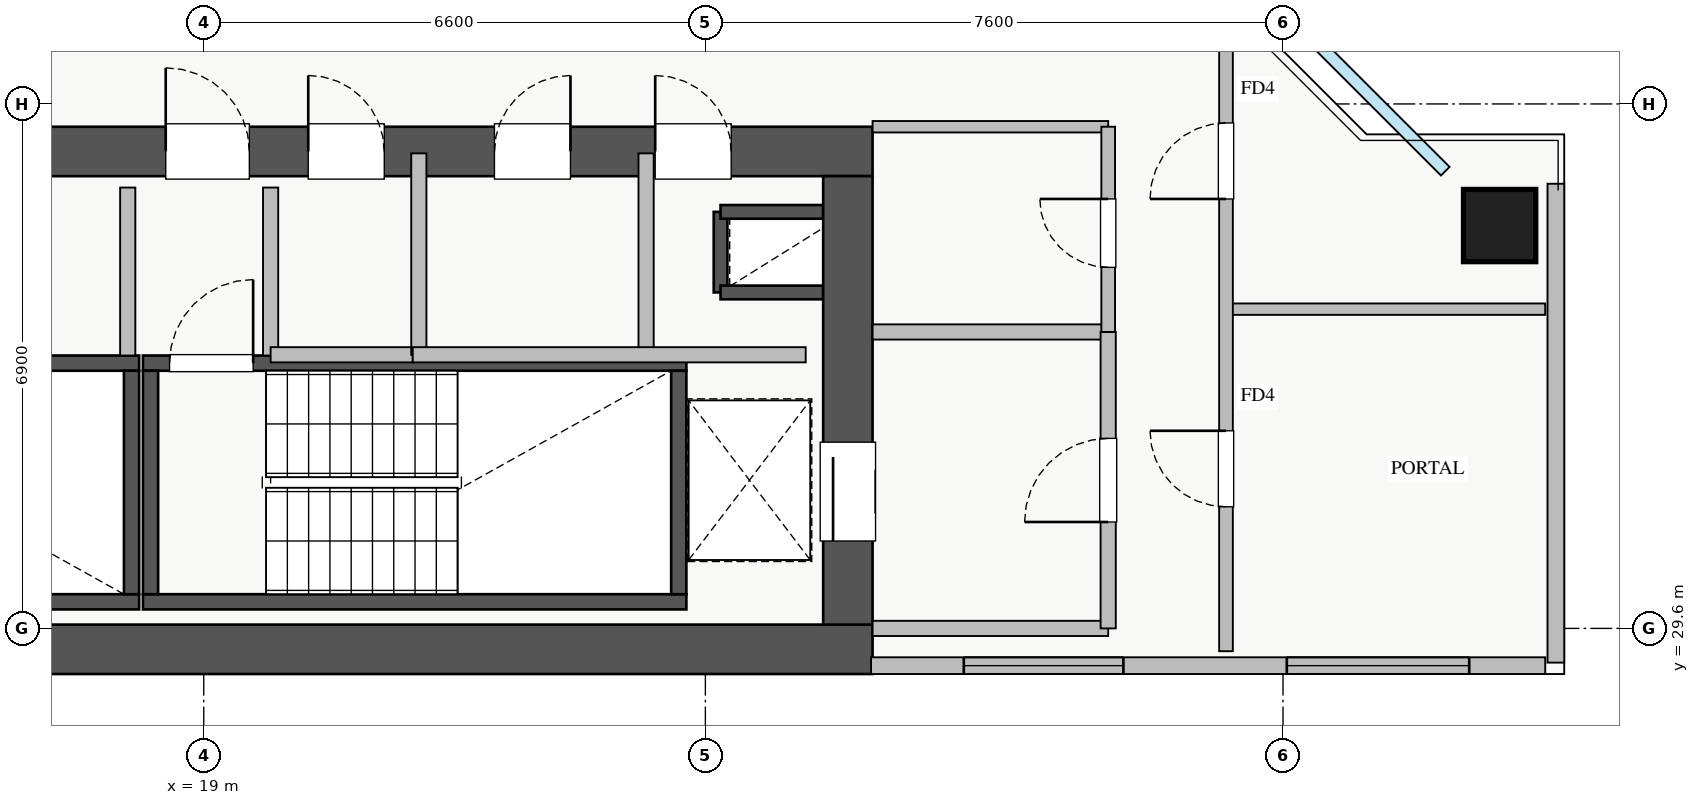
"""IFC4 building model, lengths in metres.
Left out: names, types, materials, properties, quantities, classifications, styles, units other than length and angle.
Written with IfcOpenShell. Run it as: python <this file> out.ifc"""

import sys

from ifc_helpers import new_model, si_unit, direction, frame, frame_2d, origin, origin_2d, place, context, subcontext, project, spatial, rectangle, extrude, source, transform, mapped, element, fill, save


model = new_model("IFC4")
c1 = context("Model", 3, precision=1e-05, world=origin(), true_north=direction((0.0, 1.0)))
c2 = subcontext(c1, "Body", "Model", "MODEL_VIEW")
j1 = project(units=[si_unit("LENGTHUNIT", "METRE"), si_unit("PLANEANGLEUNIT", "RADIAN")], contexts=[c1])
p1 = place(None, origin())
s1 = spatial("IfcSite", under=j1, at=p1, CompositionType="ELEMENT")
p2 = place(p1, origin())
s2 = spatial("IfcBuilding", under=s1, at=p2, CompositionType="ELEMENT")
p3 = place(p2, frame((0.0, 0.0, 166.5)))
s3 = spatial("IfcBuildingStorey", under=s2, at=p3, CompositionType="ELEMENT", Elevation=166.5)
p4 = place(p3, frame((25.8, 34.02, 0.0), z_axis=(0.0, 0.0, 1.0), x_axis=(0.0, 1.0, 0.0)))
e1 = element("IfcWall", 1, at=p4, inside=s3, PredefinedType="SHEAR", context=c2, shape_type="SweptSolid", body=[
    extrude(rectangle(XDim=1.06, YDim=0.18, at=frame_2d((0.53, 0.0))), origin(), (0.0, 0.0, 1.0), 3.07),
])
for number, where, z_axis, x_axis in (
    (2, (25.8, 35.08, 0.0), (0.0, 0.0, 1.0), (1.0, 0.0, 0.0)),
    (3, (25.8, 34.02, 0.0), (0.0, 0.0, 1.0), (1.0, 0.0, 0.0)),
):
    element("IfcWall", number, at=place(p3, frame(where, z_axis=z_axis, x_axis=x_axis)), inside=s3, PredefinedType="SHEAR", context=c2, shape_type="SweptSolid", body=[
        extrude(rectangle(XDim=1.35, YDim=0.18, at=frame_2d((0.675, 0.0))), origin(), (0.0, 0.0, 1.0), 3.07),
    ])
p5 = place(p3, frame((10.85, 29.95, 0.0), z_axis=(0.0, 0.0, 1.0), x_axis=(1.0, 0.0, 0.0)))
e4 = element("IfcWall", 4, at=p5, inside=s3, PredefinedType="SHEAR", context=c2, shape_type="SweptSolid", body=[
    extrude(rectangle(XDim=7.3, YDim=0.2, at=frame_2d((3.65, 0.0))), origin(), (0.0, 0.0, 1.0), 3.25),
])
p6 = place(p3, frame((10.85, 33.09, 0.0), z_axis=(0.0, 0.0, 1.0), x_axis=(1.0, 0.0, 0.0)))
e5 = element("IfcWall", 5, at=p6, inside=s3, PredefinedType="SHEAR", context=c2, shape_type="SweptSolid", body=[
    extrude(rectangle(XDim=7.3, YDim=0.2, at=frame_2d((3.65, 0.0))), origin(), (0.0, 0.0, 1.0), 3.25),
])
p7 = place(p6, frame((0.35, 0.0, 0.0)))
e6 = element("IfcOpeningElement", 6, at=p7, cuts=e5, PredefinedType="OPENING", context=c2, shape_type="SweptSolid", body=[
    extrude(rectangle(XDim=1.1, YDim=2.05, at=frame_2d((0.55, 1.025))), frame((0.0, 0.11, 0.0), z_axis=(0.0, -1.0, 0.0), x_axis=(1.0, 0.0, 0.0)), (0.0, 0.0, 1.0), 0.22),
])
p8 = place(p3, frame((18.05, 30.05, 0.0), z_axis=(0.0, 0.0, 1.0), x_axis=(0.0, 1.0, 0.0)))
e7 = element("IfcWall", 7, at=p8, inside=s3, PredefinedType="SHEAR", context=c2, shape_type="SweptSolid", body=[
    extrude(rectangle(XDim=2.94, YDim=0.2, at=frame_2d((1.47, 0.0))), origin(), (0.0, 0.0, 1.0), 3.25),
])
p9 = place(p3, frame((18.2, 29.95, 0.0), z_axis=(0.0, 0.0, 1.0), x_axis=(1.0, 0.0, 0.0)))
e8 = element("IfcWall", 8, at=p9, inside=s3, PredefinedType="SHEAR", context=c2, shape_type="SweptSolid", body=[
    extrude(rectangle(XDim=7.15, YDim=0.2, at=frame_2d((3.575, 0.0))), origin(), (0.0, 0.0, 1.0), 3.25),
])
p10 = place(p3, frame((18.2, 33.09, 0.0), z_axis=(0.0, 0.0, 1.0), x_axis=(1.0, 0.0, 0.0)))
e9 = element("IfcWall", 9, at=p10, inside=s3, PredefinedType="SHEAR", context=c2, shape_type="SweptSolid", body=[
    extrude(rectangle(XDim=7.15, YDim=0.2, at=frame_2d((3.575, 0.0))), origin(), (0.0, 0.0, 1.0), 3.25),
])
p11 = place(p10, frame((0.35, 0.0, 0.0)))
e10 = element("IfcOpeningElement", 10, at=p11, cuts=e9, PredefinedType="OPENING", context=c2, shape_type="SweptSolid", body=[
    extrude(rectangle(XDim=1.1, YDim=2.05, at=frame_2d((0.55, 1.025))), frame((0.0, 0.11, 0.0), z_axis=(0.0, -1.0, 0.0), x_axis=(1.0, 0.0, 0.0)), (0.0, 0.0, 1.0), 0.22),
])
for number, where, z_axis, x_axis in (
    (11, (18.3, 30.05, 0.0), (0.0, 0.0, 1.0), (0.0, 1.0, 0.0)),
    (12, (25.25, 30.05, 0.0), (0.0, 0.0, 1.0), (0.0, 1.0, 0.0)),
):
    element("IfcWall", number, at=place(p3, frame(where, z_axis=z_axis, x_axis=x_axis)), inside=s3, PredefinedType="SHEAR", context=c2, shape_type="SweptSolid", body=[
        extrude(rectangle(XDim=2.94, YDim=0.2, at=frame_2d((1.47, 0.0))), origin(), (0.0, 0.0, 1.0), 3.25),
    ])
p12 = place(p3, frame((10.2, 29.325, 0.0), z_axis=(0.0, 0.0, 1.0), x_axis=(1.0, 0.0, 0.0)))
e13 = element("IfcWall", 13, at=p12, inside=s3, PredefinedType="SHEAR", context=c2, shape_type="SweptSolid", body=[
    extrude(rectangle(XDim=17.6, YDim=0.65, at=frame_2d((8.8, 0.0))), origin(), (0.0, 0.0, 1.0), 3.25),
])
p13 = place(p3, frame((10.2, 35.875, 0.0), z_axis=(0.0, 0.0, 1.0), x_axis=(1.0, 0.0, 0.0)))
e14 = element("IfcWall", 14, at=p13, inside=s3, PredefinedType="SHEAR", context=c2, shape_type="SweptSolid", body=[
    extrude(rectangle(XDim=17.6, YDim=0.65, at=frame_2d((8.8, 0.0))), origin(), (0.0, 0.0, 1.0), 3.25),
])
p14 = place(p13, frame((1.15, 0.0, 0.0)))
e15 = element("IfcOpeningElement", 15, at=p14, cuts=e14, PredefinedType="OPENING", context=c2, shape_type="SweptSolid", body=[
    extrude(rectangle(XDim=1.1, YDim=2.05, at=frame_2d((0.55, 1.025))), frame((0.0, 0.335, 0.0), z_axis=(0.0, -1.0, 0.0), x_axis=(1.0, 0.0, 0.0)), (0.0, 0.0, 1.0), 0.67),
])
p15 = place(p13, frame((8.3, 0.0, 0.0)))
e16 = element("IfcOpeningElement", 16, at=p15, cuts=e14, PredefinedType="OPENING", context=c2, shape_type="SweptSolid", body=[
    extrude(rectangle(XDim=1.1, YDim=2.05, at=frame_2d((0.55, 1.025))), frame((0.0, 0.335, 0.0), z_axis=(0.0, -1.0, 0.0), x_axis=(1.0, 0.0, 0.0)), (0.0, 0.0, 1.0), 0.67),
])
p16 = place(p13, frame((4.9, 0.0, 0.0)))
e17 = element("IfcOpeningElement", 17, at=p16, cuts=e14, PredefinedType="OPENING", context=c2, shape_type="SweptSolid", body=[
    extrude(rectangle(XDim=1.1, YDim=2.05, at=frame_2d((0.55, 1.025))), frame((0.0, 0.335, 0.0), z_axis=(0.0, -1.0, 0.0), x_axis=(1.0, 0.0, 0.0)), (0.0, 0.0, 1.0), 0.67),
])
p17 = place(p13, frame((14.74, 0.0, 0.0)))
e18 = element("IfcOpeningElement", 18, at=p17, cuts=e14, PredefinedType="OPENING", context=c2, shape_type="SweptSolid", body=[
    extrude(rectangle(XDim=1.0, YDim=2.05, at=frame_2d((0.5, 1.025))), frame((0.0, 0.335, 0.0), z_axis=(0.0, -1.0, 0.0), x_axis=(1.0, 0.0, 0.0)), (0.0, 0.0, 1.0), 0.67),
])
p18 = place(p13, frame((10.175, 0.0, 0.0)))
e19 = element("IfcOpeningElement", 19, at=p18, cuts=e14, PredefinedType="OPENING", context=c2, shape_type="SweptSolid", body=[
    extrude(rectangle(XDim=1.0, YDim=2.05, at=frame_2d((0.5, 1.025))), frame((0.0, 0.335, 0.0), z_axis=(0.0, -1.0, 0.0), x_axis=(1.0, 0.0, 0.0)), (0.0, 0.0, 1.0), 0.67),
])
p19 = place(p13, frame((12.625, 0.0, 0.0)))
e20 = element("IfcOpeningElement", 20, at=p19, cuts=e14, PredefinedType="OPENING", context=c2, shape_type="SweptSolid", body=[
    extrude(rectangle(XDim=1.0, YDim=2.05, at=frame_2d((0.5, 1.025))), frame((0.0, 0.335, 0.0), z_axis=(0.0, -1.0, 0.0), x_axis=(1.0, 0.0, 0.0)), (0.0, 0.0, 1.0), 0.67),
])
p20 = place(p3, frame((27.475, 29.65, 0.0), z_axis=(0.0, 0.0, 1.0), x_axis=(0.0, 1.0, 0.0)))
e21 = element("IfcWall", 21, at=p20, inside=s3, PredefinedType="SHEAR", context=c2, shape_type="SweptSolid", body=[
    extrude(rectangle(XDim=5.9, YDim=0.65, at=frame_2d((2.95, 0.0))), origin(), (0.0, 0.0, 1.0), 3.25),
])
p21 = place(p20, frame((1.1, 0.0, 0.0)))
e22 = element("IfcOpeningElement", 22, at=p21, cuts=e21, PredefinedType="OPENING", context=c2, shape_type="SweptSolid", body=[
    extrude(rectangle(XDim=1.3, YDim=2.05, at=frame_2d((0.65, 1.025))), frame((0.0, 0.335, 0.0), z_axis=(0.0, -1.0, 0.0), x_axis=(1.0, 0.0, 0.0)), (0.0, 0.0, 1.0), 0.67),
])
m1 = source(origin(), c2, "Body", "SweptSolid", [
    extrude(rectangle(XDim=0.95, YDim=0.95, at=origin_2d()), origin(), (0.0, 0.0, 1.0), 3.25),
])
p22 = place(p3, frame((36.05, 34.9, 0.0), z_axis=(0.0, 0.0, 1.0), x_axis=(1.0, 0.0, 0.0)))
e23 = element("IfcColumn", 23, at=p22, inside=s3, PredefinedType="COLUMN", context=c2, shape_type="MappedRepresentation", body=[
    mapped(m1, transform((0.0, 0.0, 0.0), x_axis=(1.0, 0.0, 0.0), y_axis=(0.0, 1.0, 0.0), z_axis=(0.0, 0.0, 1.0), scale=1.0)),
])
p23 = place(p3, frame((27.78, 29.11, 0.0), z_axis=(0.0, 0.0, 1.0), x_axis=(1.0, 0.0, 0.0)))
e24 = element("IfcWall", 24, at=p23, inside=s3, PredefinedType="STANDARD", context=c2, shape_type="SweptSolid", body=[
    extrude(rectangle(XDim=8.87, YDim=0.22, at=frame_2d((4.435, 0.0))), origin(), (0.0, 0.0, 1.0), 2.61),
])
p24 = place(p23, frame((1.22, 0.0, 0.9)))
e25 = element("IfcOpeningElement", 25, at=p24, cuts=e24, PredefinedType="OPENING", context=c2, shape_type="SweptSolid", body=[
    extrude(rectangle(XDim=2.1, YDim=1.48, at=frame_2d((1.05, 0.74))), frame((0.0, 0.12, 0.0), z_axis=(0.0, -1.0, 0.0), x_axis=(1.0, 0.0, 0.0)), (0.0, 0.0, 1.0), 0.24),
])
p25 = place(p23, frame((5.47, 0.0, 0.9)))
e26 = element("IfcOpeningElement", 26, at=p25, cuts=e24, PredefinedType="OPENING", context=c2, shape_type="SweptSolid", body=[
    extrude(rectangle(XDim=2.4, YDim=1.48, at=frame_2d((1.2, 0.74))), frame((0.0, 0.12, 0.0), z_axis=(0.0, -1.0, 0.0), x_axis=(1.0, 0.0, 0.0)), (0.0, 0.0, 1.0), 0.24),
])
p26 = place(p3, frame((36.79, 29.15, 0.0), z_axis=(0.0, 0.0, 1.0), x_axis=(0.0, 1.0, 0.0)))
e27 = element("IfcWall", 27, at=p26, inside=s3, PredefinedType="STANDARD", context=c2, shape_type="SweptSolid", body=[
    extrude(rectangle(XDim=6.3, YDim=0.22, at=frame_2d((3.15, 0.0))), origin(), (0.0, 0.0, 1.0), 2.61),
])
for number, where, z_axis, x_axis in (
    (28, (27.8, 29.6, 0.0), (0.0, 0.0, 1.0), (1.0, 0.0, 0.0)),
    (29, (27.8, 33.5, 0.0), (0.0, 0.0, 1.0), (1.0, 0.0, 0.0)),
):
    element("IfcWall", number, at=place(p3, frame(where, z_axis=z_axis, x_axis=x_axis)), inside=s3, PredefinedType="PARTITIONING", context=c2, shape_type="SweptSolid", body=[
        extrude(rectangle(XDim=3.1, YDim=0.2, at=frame_2d((1.55, 0.0))), origin(), (0.0, 0.0, 1.0), 3.07),
    ])
p27 = place(p3, frame((30.9, 29.6, 0.0), z_axis=(0.0, 0.0, 1.0), x_axis=(0.0, 1.0, 0.0)))
e30 = element("IfcWall", 30, at=p27, inside=s3, PredefinedType="PARTITIONING", context=c2, shape_type="SweptSolid", body=[
    extrude(rectangle(XDim=3.9, YDim=0.2, at=frame_2d((1.95, 0.0))), origin(), (0.0, 0.0, 1.0), 3.07),
])
p28 = place(p27, frame((1.4, 0.0, 0.0)))
e31 = element("IfcOpeningElement", 31, at=p28, cuts=e30, PredefinedType="OPENING", context=c2, shape_type="SweptSolid", body=[
    extrude(rectangle(XDim=1.1, YDim=2.05, at=frame_2d((0.55, 1.025))), frame((0.0, 0.11, 0.0), z_axis=(0.0, -1.0, 0.0), x_axis=(1.0, 0.0, 0.0)), (0.0, 0.0, 1.0), 0.22),
])
for number, where, z_axis, x_axis in (
    (32, (18.0, 33.19, 0.0), (0.0, 0.0, 1.0), (0.0, 1.0, 0.0)),
    (33, (19.88, 33.19, 0.0), (0.0, 0.0, 1.0), (0.0, 1.0, 0.0)),
):
    element("IfcWall", number, at=place(p3, frame(where, z_axis=z_axis, x_axis=x_axis)), inside=s3, PredefinedType="PARTITIONING", context=c2, shape_type="SweptSolid", body=[
        extrude(rectangle(XDim=2.21, YDim=0.2, at=frame_2d((1.105, 0.0))), origin(), (0.0, 0.0, 1.0), 3.07),
    ])
p29 = place(p3, frame((24.82, 33.2, 0.0), z_axis=(0.0, 0.0, 1.0), x_axis=(0.0, 1.0, 0.0)))
e34 = element("IfcWall", 34, at=p29, inside=s3, PredefinedType="PARTITIONING", context=c2, shape_type="SweptSolid", body=[
    extrude(rectangle(XDim=2.65, YDim=0.2, at=frame_2d((1.325, 0.0))), origin(), (0.0, 0.0, 1.0), 3.07),
])
p30 = place(p3, frame((19.88, 33.2, 0.0), z_axis=(0.0, 0.0, 1.0), x_axis=(1.0, 0.0, 0.0)))
e35 = element("IfcWall", 35, at=p30, inside=s3, PredefinedType="PARTITIONING", context=c2, shape_type="SweptSolid", body=[
    extrude(rectangle(XDim=1.87, YDim=0.2, at=frame_2d((0.935, 0.0))), origin(), (0.0, 0.0, 1.0), 3.07),
])
p31 = place(p3, frame((21.83, 33.2, 0.0), z_axis=(0.0, 0.0, 1.0), x_axis=(0.0, 1.0, 0.0)))
e36 = element("IfcWall", 36, at=p31, inside=s3, PredefinedType="PARTITIONING", context=c2, shape_type="SweptSolid", body=[
    extrude(rectangle(XDim=2.65, YDim=0.2, at=frame_2d((1.325, 0.0))), origin(), (0.0, 0.0, 1.0), 3.07),
])
p32 = place(p3, frame((21.75, 33.2, 0.0), z_axis=(0.0, 0.0, 1.0), x_axis=(1.0, 0.0, 0.0)))
e37 = element("IfcWall", 37, at=p32, inside=s3, PredefinedType="PARTITIONING", context=c2, shape_type="SweptSolid", body=[
    extrude(rectangle(XDim=5.17, YDim=0.2, at=frame_2d((2.585, 0.0))), origin(), (0.0, 0.0, 1.0), 3.07),
])
p33 = place(p3, frame((27.8, 36.2, 0.0), z_axis=(0.0, 0.0, 1.0), x_axis=(1.0, 0.0, 0.0)))
e38 = element("IfcWall", 38, at=p33, inside=s3, PredefinedType="PARTITIONING", context=c2, shape_type="SweptSolid", body=[
    extrude(rectangle(XDim=3.1, YDim=0.15, at=frame_2d((1.55, 0.0))), origin(), (0.0, 0.0, 1.0), 3.07),
])
p34 = place(p3, frame((30.9, 33.5, 0.0), z_axis=(0.0, 0.0, 1.0), x_axis=(0.0, 1.0, 0.0)))
e39 = element("IfcWall", 39, at=p34, inside=s3, PredefinedType="PARTITIONING", context=c2, shape_type="SweptSolid", body=[
    extrude(rectangle(XDim=2.7, YDim=0.18, at=frame_2d((1.35, 0.0))), origin(), (0.0, 0.0, 1.0), 2.565),
])
p35 = place(p34, frame((0.85, 0.0, 0.0)))
e40 = element("IfcOpeningElement", 40, at=p35, cuts=e39, PredefinedType="OPENING", context=c2, shape_type="SweptSolid", body=[
    extrude(rectangle(XDim=0.9, YDim=2.05, at=frame_2d((0.45, 1.025))), frame((0.0, 0.1, 0.0), z_axis=(0.0, -1.0, 0.0), x_axis=(1.0, 0.0, 0.0)), (0.0, 0.0, 1.0), 0.2),
])
p36 = place(p3, frame((32.45, 33.8, 0.0), z_axis=(0.0, 0.0, 1.0), x_axis=(1.0, 0.0, 0.0)))
e41 = element("IfcWall", 41, at=p36, inside=s3, PredefinedType="PARTITIONING", context=c2, shape_type="SweptSolid", body=[
    extrude(rectangle(XDim=4.2, YDim=0.15, at=frame_2d((2.1, 0.0))), origin(), (0.0, 0.0, 1.0), 3.07),
])
p37 = place(p3, frame((32.45, 29.3, 0.0), z_axis=(0.0, 0.0, 1.0), x_axis=(0.0, 1.0, 0.0)))
e42 = element("IfcWall", 42, at=p37, inside=s3, PredefinedType="PARTITIONING", context=c2, shape_type="SweptSolid", body=[
    extrude(rectangle(XDim=11.35, YDim=0.18, at=frame_2d((5.675, 0.0))), origin(), (0.0, 0.0, 1.0), 3.07),
])
p38 = place(p37, frame((1.9, 0.0, 0.0)))
e43 = element("IfcOpeningElement", 43, at=p38, cuts=e42, PredefinedType="OPENING", context=c2, shape_type="SweptSolid", body=[
    extrude(rectangle(XDim=1.0, YDim=2.05, at=frame_2d((0.5, 1.025))), frame((0.0, 0.1, 0.0), z_axis=(0.0, -1.0, 0.0), x_axis=(1.0, 0.0, 0.0)), (0.0, 0.0, 1.0), 0.2),
])
p39 = place(p37, frame((5.95, 0.0, 0.0)))
e44 = element("IfcOpeningElement", 44, at=p39, cuts=e42, PredefinedType="OPENING", context=c2, shape_type="SweptSolid", body=[
    extrude(rectangle(XDim=1.0, YDim=2.05, at=frame_2d((0.5, 1.025))), frame((0.0, 0.1, 0.0), z_axis=(0.0, -1.0, 0.0), x_axis=(1.0, 0.0, 0.0)), (0.0, 0.0, 1.0), 0.2),
])
m2 = source(origin(), c2, "Body", "SweptSolid", [
    extrude(rectangle(XDim=2.1, YDim=1.48, at=frame_2d((1.05, 0.74))), frame((0.0, 0.03, 0.0), z_axis=(0.0, -1.0, 0.0), x_axis=(1.0, 0.0, 0.0)), (0.0, 0.0, 1.0), 0.06),
])
p40 = place(p24, origin())
e45 = element("IfcWindow", 45, at=p40, inside=s3, PartitioningType="TRIPLE_PANEL_VERTICAL", PredefinedType="WINDOW", context=c2, shape_type="MappedRepresentation", body=[
    mapped(m2, transform((0.0, 0.0, 0.0), x_axis=(1.0, 0.0, 0.0), y_axis=(0.0, 1.0, 0.0), z_axis=(0.0, 0.0, 1.0), scale=1.0)),
])
fill(e25, e45)
m3 = source(origin(), c2, "Body", "SweptSolid", [
    extrude(rectangle(XDim=2.4, YDim=1.48, at=frame_2d((1.2, 0.74))), frame((0.0, 0.03, 0.0), z_axis=(0.0, -1.0, 0.0), x_axis=(1.0, 0.0, 0.0)), (0.0, 0.0, 1.0), 0.06),
])
p41 = place(p25, origin())
e46 = element("IfcWindow", 46, at=p41, inside=s3, PartitioningType="TRIPLE_PANEL_VERTICAL", PredefinedType="WINDOW", context=c2, shape_type="MappedRepresentation", body=[
    mapped(m3, transform((0.0, 0.0, 0.0), x_axis=(1.0, 0.0, 0.0), y_axis=(0.0, 1.0, 0.0), z_axis=(0.0, 0.0, 1.0), scale=1.0)),
])
fill(e26, e46)
m4 = source(origin(), c2, "Body", "SweptSolid", [
    extrude(rectangle(XDim=1.3, YDim=2.05, at=frame_2d((0.65, 1.025))), frame((0.0, 0.025, 0.0), z_axis=(0.0, -1.0, 0.0), x_axis=(1.0, 0.0, 0.0)), (0.0, 0.0, 1.0), 0.05),
])
p42 = place(p21, origin())
e47 = element("IfcDoor", 47, at=p42, inside=s3, OperationType="SLIDING_TO_LEFT", PredefinedType="DOOR", context=c2, shape_type="MappedRepresentation", body=[
    mapped(m4, transform((0.0, 0.0, 0.0), x_axis=(1.0, 0.0, 0.0), y_axis=(0.0, 1.0, 0.0), z_axis=(0.0, 0.0, 1.0), scale=1.0)),
])
fill(e22, e47)
m5 = source(origin(), c2, "Body", "SweptSolid", [
    extrude(rectangle(XDim=1.1, YDim=2.05, at=frame_2d((0.55, 1.025))), frame((0.0, 0.025, 0.0), z_axis=(0.0, -1.0, 0.0), x_axis=(1.0, 0.0, 0.0)), (0.0, 0.0, 1.0), 0.05),
])
p43 = place(p15, origin())
e48 = element("IfcDoor", 48, at=p43, inside=s3, OperationType="SINGLE_SWING_LEFT", PredefinedType="DOOR", context=c2, shape_type="MappedRepresentation", body=[
    mapped(m5, transform((0.0, 0.0, 0.0), x_axis=(1.0, 0.0, 0.0), y_axis=(0.0, 1.0, 0.0), z_axis=(0.0, 0.0, 1.0), scale=1.0)),
])
fill(e16, e48)
p44 = place(p11, origin())
e49 = element("IfcDoor", 49, at=p44, inside=s3, OperationType="SINGLE_SWING_RIGHT", PredefinedType="DOOR", context=c2, shape_type="MappedRepresentation", body=[
    mapped(m5, transform((0.0, 0.0, 0.0), x_axis=(1.0, 0.0, 0.0), y_axis=(0.0, 1.0, 0.0), z_axis=(0.0, 0.0, 1.0), scale=1.0)),
])
fill(e10, e49)
m6 = source(origin(), c2, "Body", "SweptSolid", [
    extrude(rectangle(XDim=1.0, YDim=2.05, at=frame_2d((0.5, 1.025))), frame((0.0, 0.025, 0.0), z_axis=(0.0, -1.0, 0.0), x_axis=(1.0, 0.0, 0.0)), (0.0, 0.0, 1.0), 0.05),
])
p45 = place(p17, origin())
e50 = element("IfcDoor", 50, at=p45, inside=s3, OperationType="SINGLE_SWING_LEFT", PredefinedType="DOOR", context=c2, shape_type="MappedRepresentation", body=[
    mapped(m6, transform((0.0, 0.0, 0.0), x_axis=(1.0, 0.0, 0.0), y_axis=(0.0, 1.0, 0.0), z_axis=(0.0, 0.0, 1.0), scale=1.0)),
])
fill(e18, e50)
p46 = place(p18, origin())
e51 = element("IfcDoor", 51, at=p46, inside=s3, OperationType="SINGLE_SWING_LEFT", PredefinedType="DOOR", context=c2, shape_type="MappedRepresentation", body=[
    mapped(m6, transform((0.0, 0.0, 0.0), x_axis=(1.0, 0.0, 0.0), y_axis=(0.0, 1.0, 0.0), z_axis=(0.0, 0.0, 1.0), scale=1.0)),
])
fill(e19, e51)
p47 = place(p19, origin())
e52 = element("IfcDoor", 52, at=p47, inside=s3, OperationType="SINGLE_SWING_RIGHT", PredefinedType="DOOR", context=c2, shape_type="MappedRepresentation", body=[
    mapped(m6, transform((0.0, 0.0, 0.0), x_axis=(1.0, 0.0, 0.0), y_axis=(0.0, 1.0, 0.0), z_axis=(0.0, 0.0, 1.0), scale=1.0)),
])
fill(e20, e52)
p48 = place(p28, origin())
e53 = element("IfcDoor", 53, at=p48, inside=s3, OperationType="SINGLE_SWING_LEFT", PredefinedType="DOOR", context=c2, shape_type="MappedRepresentation", body=[
    mapped(m5, transform((0.0, 0.0, 0.0), x_axis=(1.0, 0.0, 0.0), y_axis=(0.0, 1.0, 0.0), z_axis=(0.0, 0.0, 1.0), scale=1.0)),
])
fill(e31, e53)
m7 = source(origin(), c2, "Body", "SweptSolid", [
    extrude(rectangle(XDim=0.9, YDim=2.05, at=frame_2d((0.45, 1.025))), frame((0.0, 0.025, 0.0), z_axis=(0.0, -1.0, 0.0), x_axis=(1.0, 0.0, 0.0)), (0.0, 0.0, 1.0), 0.05),
])
p49 = place(p35, origin())
e54 = element("IfcDoor", 54, at=p49, inside=s3, OperationType="SINGLE_SWING_RIGHT", PredefinedType="DOOR", context=c2, shape_type="MappedRepresentation", body=[
    mapped(m7, transform((0.0, 0.0, 0.0), x_axis=(1.0, 0.0, 0.0), y_axis=(0.0, 1.0, 0.0), z_axis=(0.0, 0.0, 1.0), scale=1.0)),
])
fill(e40, e54)
p50 = place(p38, origin())
e55 = element("IfcDoor", 55, at=p50, inside=s3, OperationType="SINGLE_SWING_RIGHT", PredefinedType="DOOR", context=c2, shape_type="MappedRepresentation", body=[
    mapped(m6, transform((0.0, 0.0, 0.0), x_axis=(1.0, 0.0, 0.0), y_axis=(0.0, 1.0, 0.0), z_axis=(0.0, 0.0, 1.0), scale=1.0)),
])
fill(e43, e55)
p51 = place(p39, origin())
e56 = element("IfcDoor", 56, at=p51, inside=s3, OperationType="SINGLE_SWING_LEFT", PredefinedType="DOOR", context=c2, shape_type="MappedRepresentation", body=[
    mapped(m6, transform((0.0, 0.0, 0.0), x_axis=(1.0, 0.0, 0.0), y_axis=(0.0, 1.0, 0.0), z_axis=(0.0, 0.0, 1.0), scale=1.0)),
])
fill(e44, e56)
save(model, sys.argv[1])
